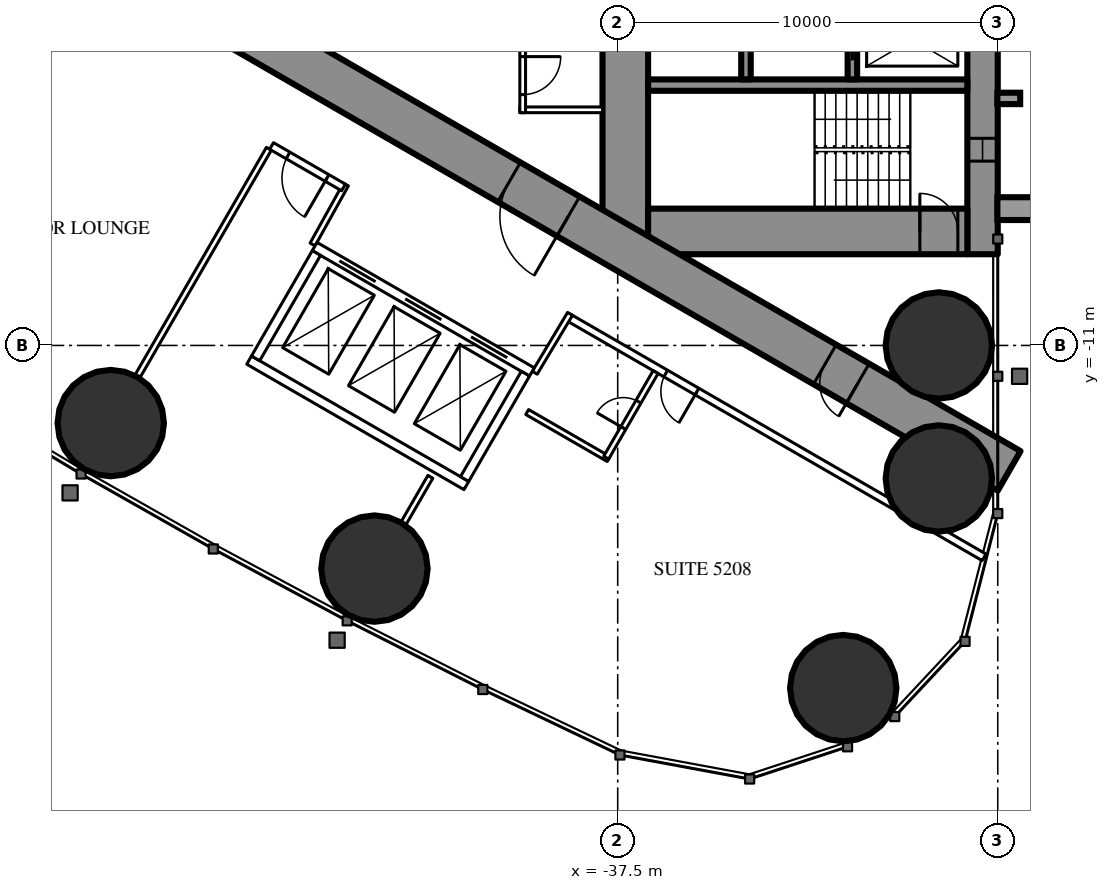
"""IFC4 building model, lengths in metres.
Left out: names, types, materials, properties, quantities, classifications, styles, units other than length and angle.
Written with IfcOpenShell. Run it as: python <this file> out.ifc"""

import sys

from ifc_helpers import new_model, si_unit, direction, frame, frame_2d, origin, origin_2d, place, context, subcontext, project, spatial, rectangle, circle, extrude, element, fill, save


model = new_model("IFC4")
c1 = context("Model", 3, precision=1e-05, world=origin(), true_north=direction((0.0, 1.0)))
c2 = subcontext(c1, "Body", "Model", "MODEL_VIEW")
j1 = project(units=[si_unit("LENGTHUNIT", "METRE"), si_unit("PLANEANGLEUNIT", "RADIAN")], contexts=[c1])
p1 = place(None, origin())
s1 = spatial("IfcSite", under=j1, at=p1, CompositionType="ELEMENT")
p2 = place(p1, origin())
s2 = spatial("IfcBuilding", under=s1, at=p2, CompositionType="ELEMENT")
p3 = place(p2, frame((0.0, 0.0, 194.8)))
s3 = spatial("IfcBuildingStorey", under=s2, at=p3, CompositionType="ELEMENT", Elevation=194.8)
for number, where, z_axis, x_axis in (
    (1, (-31.565, -20.016, 0.0), (0.0, 0.0, 1.0), (1.0, 0.0, 0.0)),
    (2, (-29.05, -11.0, 0.0), (0.0, 0.0, 1.0), (1.0, 0.0, 0.0)),
    (3, (-29.05, -14.5, 0.0), (0.0, 0.0, 1.0), (1.0, 0.0, 0.0)),
    (4, (-50.839, -13.043, 0.0), (0.0, 0.0, 1.0), (1.0, 0.0, 0.0)),
    (5, (-43.9, -16.871, 0.0), (0.0, 0.0, 1.0), (1.0, 0.0, 0.0)),
):
    element("IfcColumn", number, at=place(p3, frame(where, z_axis=z_axis, x_axis=x_axis)), inside=s3, PredefinedType="COLUMN", context=c2, shape_type="SweptSolid", body=[
        extrude(circle(Radius=1.4, at=origin_2d()), origin(), (0.0, 0.0, 1.0), 3.5),
    ])
p4 = place(p3, frame((-27.9, 8.6, 0.0), z_axis=(0.0, 0.0, 1.0), x_axis=(0.0, -1.0, 0.0)))
e6 = element("IfcWall", 6, at=p4, inside=s3, PredefinedType="SHEAR", context=c2, shape_type="SweptSolid", body=[
    extrude(rectangle(XDim=17.2, YDim=0.8, at=frame_2d((8.6, 0.0))), origin(), (0.0, 0.0, 1.0), 3.5),
])
p5 = place(p4, frame((2.45, 0.0, 0.6)))
e7 = element("IfcOpeningElement", 7, at=p5, cuts=e6, PredefinedType="OPENING", context=c2, shape_type="SweptSolid", body=[
    extrude(rectangle(XDim=0.6, YDim=2.1, at=frame_2d((0.3, 1.05))), frame((0.0, 0.41, 0.0), z_axis=(0.0, -1.0, 0.0), x_axis=(1.0, 0.0, 0.0)), (0.0, 0.0, 1.0), 0.82),
])
p6 = place(p4, frame((14.15, 0.0, 0.6)))
e8 = element("IfcOpeningElement", 8, at=p6, cuts=e6, PredefinedType="OPENING", context=c2, shape_type="SweptSolid", body=[
    extrude(rectangle(XDim=0.6, YDim=2.1, at=frame_2d((0.3, 1.05))), frame((0.0, 0.41, 0.0), z_axis=(0.0, -1.0, 0.0), x_axis=(1.0, 0.0, 0.0)), (0.0, 0.0, 1.0), 0.82),
])
p7 = place(p3, frame((-37.3, 8.6, 0.0), z_axis=(0.0, 0.0, 1.0), x_axis=(0.0, -1.0, 0.0)))
e9 = element("IfcWall", 9, at=p7, inside=s3, PredefinedType="SHEAR", context=c2, shape_type="SweptSolid", body=[
    extrude(rectangle(XDim=17.2, YDim=1.2, at=frame_2d((8.6, 0.0))), origin(), (0.0, 0.0, 1.0), 3.5),
])
p8 = place(p7, frame((7.7, 0.0, 0.0)))
e10 = element("IfcOpeningElement", 10, at=p8, cuts=e9, PredefinedType="OPENING", context=c2, shape_type="SweptSolid", body=[
    extrude(rectangle(XDim=1.8, YDim=2.2, at=frame_2d((0.9, 1.1))), frame((0.0, 0.61, 0.0), z_axis=(0.0, -1.0, 0.0), x_axis=(1.0, 0.0, 0.0)), (0.0, 0.0, 1.0), 1.22),
])
p9 = place(p3, frame((-28.3, -8.0, 0.0), z_axis=(0.0, 0.0, 1.0), x_axis=(-1.0, 0.0, 0.0)))
e11 = element("IfcWall", 11, at=p9, inside=s3, PredefinedType="SHEAR", context=c2, shape_type="SweptSolid", body=[
    extrude(rectangle(XDim=8.4, YDim=1.2, at=frame_2d((4.2, 0.0))), origin(), (0.0, 0.0, 1.0), 3.5),
])
p10 = place(p9, frame((0.25, 0.0, 0.0)))
e12 = element("IfcOpeningElement", 12, at=p10, cuts=e11, PredefinedType="OPENING", context=c2, shape_type="SweptSolid", body=[
    extrude(rectangle(XDim=1.0, YDim=2.2, at=frame_2d((0.5, 1.1))), frame((0.0, 0.61, 0.0), z_axis=(0.0, -1.0, 0.0), x_axis=(1.0, 0.0, 0.0)), (0.0, 0.0, 1.0), 1.22),
])
p11 = place(p3, frame((-28.3, -4.15, 0.0), z_axis=(0.0, 0.0, 1.0), x_axis=(-1.0, 0.0, 0.0)))
e13 = element("IfcWall", 13, at=p11, inside=s3, PredefinedType="SHEAR", context=c2, shape_type="SweptSolid", body=[
    extrude(rectangle(XDim=8.4, YDim=0.3, at=frame_2d((4.2, 0.0))), origin(), (0.0, 0.0, 1.0), 3.5),
])
p12 = place(p3, frame((-31.325, -1.9, 0.0), z_axis=(0.0, 0.0, 1.0), x_axis=(0.0, -1.0, 0.0)))
e14 = element("IfcWall", 14, at=p12, inside=s3, PredefinedType="SHEAR", context=c2, shape_type="SweptSolid", body=[
    extrude(rectangle(XDim=2.1, YDim=0.25, at=frame_2d((1.05, 0.0))), origin(), (0.0, 0.0, 1.0), 3.5),
])
p13 = place(p12, frame((0.5, 0.0, 0.0)))
e15 = element("IfcOpeningElement", 15, at=p13, cuts=e14, PredefinedType="OPENING", context=c2, shape_type="SweptSolid", body=[
    extrude(rectangle(XDim=1.1, YDim=2.2, at=frame_2d((0.55, 1.1))), frame((0.0, 0.135, 0.0), z_axis=(0.0, -1.0, 0.0), x_axis=(1.0, 0.0, 0.0)), (0.0, 0.0, 1.0), 0.27),
])
p14 = place(p3, frame((-34.125, -1.65, 0.0), z_axis=(0.0, 0.0, 1.0), x_axis=(0.0, -1.0, 0.0)))
e16 = element("IfcWall", 16, at=p14, inside=s3, PredefinedType="SHEAR", context=c2, shape_type="SweptSolid", body=[
    extrude(rectangle(XDim=2.35, YDim=0.25, at=frame_2d((1.175, 0.0))), origin(), (0.0, 0.0, 1.0), 3.5),
])
p15 = place(p14, frame((0.875, 0.0, 0.0)))
e17 = element("IfcOpeningElement", 17, at=p15, cuts=e16, PredefinedType="OPENING", context=c2, shape_type="SweptSolid", body=[
    extrude(rectangle(XDim=0.6, YDim=2.0, at=frame_2d((0.3, 1.0))), frame((0.0, 0.135, 0.0), z_axis=(0.0, -1.0, 0.0), x_axis=(1.0, 0.0, 0.0)), (0.0, 0.0, 1.0), 0.27),
])
p16 = place(p3, frame((-27.2, -14.3, 0.0), z_axis=(0.0, 0.0, 1.0), x_axis=(-0.866024021859, 0.500002393557, 0.0)))
e18 = element("IfcWall", 18, at=p16, inside=s3, PredefinedType="SHEAR", context=c2, shape_type="SweptSolid", body=[
    extrude(rectangle(XDim=27.907, YDim=1.2, at=frame_2d((13.954, 0.0))), origin(), (0.0, 0.0, 1.0), 3.5),
])
p17 = place(p16, frame((4.6, 0.0, 0.0)))
e19 = element("IfcOpeningElement", 19, at=p17, cuts=e18, PredefinedType="OPENING", context=c2, shape_type="SweptSolid", body=[
    extrude(rectangle(XDim=1.0, YDim=2.2, at=frame_2d((0.5, 1.1))), frame((0.0, 0.61, 0.0), z_axis=(0.0, -1.0, 0.0), x_axis=(1.0, 0.0, 0.0)), (0.0, 0.0, 1.0), 1.22),
])
p18 = place(p16, frame((13.395, 0.0, 0.0)))
e20 = element("IfcOpeningElement", 20, at=p18, cuts=e18, PredefinedType="OPENING", context=c2, shape_type="SweptSolid", body=[
    extrude(rectangle(XDim=1.8, YDim=2.2, at=frame_2d((0.9, 1.1))), frame((0.0, 0.61, 0.0), z_axis=(0.0, -1.0, 0.0), x_axis=(1.0, 0.0, 0.0)), (0.0, 0.0, 1.0), 1.22),
])
p19 = place(p3, frame((-46.679, -5.825, 0.0), z_axis=(0.0, 0.0, 1.0), x_axis=(-0.500006839597, -0.866021454905, 0.0)))
e21 = element("IfcWall", 21, at=p19, inside=s3, PredefinedType="PARTITIONING", context=c2, shape_type="SweptSolid", body=[
    extrude(rectangle(XDim=6.911, YDim=0.15, at=frame_2d((3.456, 0.0))), origin(), (0.0, 0.0, 1.0), 2.3),
])
p20 = place(p3, frame((-42.429, -14.457, 0.0), z_axis=(0.0, 0.0, 1.0), x_axis=(-0.5000578829, -0.865991982497, 0.0)))
e22 = element("IfcWall", 22, at=p20, inside=s3, PredefinedType="PARTITIONING", context=c2, shape_type="SweptSolid", body=[
    extrude(rectangle(XDim=1.407, YDim=0.15, at=frame_2d((0.704, 0.0))), origin(), (0.0, 0.0, 1.0), 3.25),
])
p21 = place(p3, frame((-27.86, -16.575, 0.0), z_axis=(0.0, 0.0, 1.0), x_axis=(-0.866027756871, 0.499995924312, 0.0)))
e23 = element("IfcWall", 23, at=p21, inside=s3, PredefinedType="PARTITIONING", context=c2, shape_type="SweptSolid", body=[
    extrude(rectangle(XDim=12.622, YDim=0.2, at=frame_2d((6.311, 0.0))), origin(), (0.0, 0.0, 1.0), 3.25),
])
p22 = place(p21, frame((8.722, 0.0, 0.0)))
e24 = element("IfcOpeningElement", 24, at=p22, cuts=e23, PredefinedType="OPENING", context=c2, shape_type="SweptSolid", body=[
    extrude(rectangle(XDim=0.95, YDim=2.2, at=frame_2d((0.475, 1.1))), frame((0.0, 0.11, 0.0), z_axis=(0.0, -1.0, 0.0), x_axis=(1.0, 0.0, 0.0)), (0.0, 0.0, 1.0), 0.22),
])
for number, where, z_axis, x_axis in (
    (25, (-39.683, -11.718, 0.0), (0.0, 0.0, 1.0), (0.514, 0.858, 0.0)),
    (26, (-44.652, -6.764, 0.0), (0.0, 0.0, 1.0), (-0.485, -0.874, 0.0)),
):
    element("IfcWall", number, at=place(p3, frame(where, z_axis=z_axis, x_axis=x_axis)), inside=s3, PredefinedType="PARTITIONING", context=c2, shape_type="SweptSolid", body=[
        extrude(rectangle(XDim=1.805, YDim=0.15, at=frame_2d((0.903, 0.0))), origin(), (0.0, 0.0, 1.0), 3.25),
    ])
p23 = place(p3, frame((-44.715, -6.844, 0.0), z_axis=(0.0, 0.0, 1.0), x_axis=(-0.865999496279, 0.500044870432, 0.0)))
e27 = element("IfcWall", 27, at=p23, inside=s3, PredefinedType="PARTITIONING", context=c2, shape_type="SweptSolid", body=[
    extrude(rectangle(XDim=2.185, YDim=0.2, at=frame_2d((1.092, 0.0))), origin(), (0.0, 0.0, 1.0), 3.25),
])
p24 = place(p23, frame((0.5, 0.0, 0.0)))
e28 = element("IfcOpeningElement", 28, at=p24, cuts=e27, PredefinedType="OPENING", context=c2, shape_type="SweptSolid", body=[
    extrude(rectangle(XDim=1.185, YDim=2.2, at=frame_2d((0.593, 1.1))), frame((0.0, 0.11, 0.0), z_axis=(0.0, -1.0, 0.0), x_axis=(1.0, 0.0, 0.0)), (0.0, 0.0, 1.0), 0.22),
])
p25 = place(p3, frame((-37.738, -13.989, 0.0), z_axis=(0.0, 0.0, 1.0), x_axis=(-0.86604923931, 0.499958713387, 0.0)))
e29 = element("IfcWall", 29, at=p25, inside=s3, PredefinedType="PARTITIONING", context=c2, shape_type="SweptSolid", body=[
    extrude(rectangle(XDim=2.475, YDim=0.15, at=frame_2d((1.237, 0.0))), origin(), (0.0, 0.0, 1.0), 3.25),
])
p26 = place(p3, frame((-36.503, -11.7, 0.0), z_axis=(0.0, 0.0, 1.0), x_axis=(-0.500006934395, -0.866021400173, 0.0)))
e30 = element("IfcWall", 30, at=p26, inside=s3, PredefinedType="PARTITIONING", context=c2, shape_type="SweptSolid", body=[
    extrude(rectangle(XDim=2.6, YDim=0.15, at=frame_2d((1.3, 0.0))), origin(), (0.0, 0.0, 1.0), 3.25),
])
p27 = place(p26, frame((0.9, 0.0, 0.0)))
e31 = element("IfcOpeningElement", 31, at=p27, cuts=e30, PredefinedType="OPENING", context=c2, shape_type="SweptSolid", body=[
    extrude(rectangle(XDim=0.8, YDim=2.2, at=frame_2d((0.4, 1.1))), frame((0.0, 0.085, 0.0), z_axis=(0.0, -1.0, 0.0), x_axis=(1.0, 0.0, 0.0)), (0.0, 0.0, 1.0), 0.17),
])
p28 = place(p3, frame((-37.9, -4.8, 0.0), z_axis=(0.0, 0.0, 1.0), x_axis=(-1.0, 0.0, 0.0)))
e32 = element("IfcWall", 32, at=p28, inside=s3, PredefinedType="PARTITIONING", context=c2, shape_type="SweptSolid", body=[
    extrude(rectangle(XDim=2.175, YDim=0.15, at=frame_2d((1.087, 0.0))), origin(), (0.0, 0.0, 1.0), 3.25),
])
p29 = place(p3, frame((-40.0, -2.925, 0.0), z_axis=(0.0, 0.0, 1.0), x_axis=(0.0, -1.0, 0.0)))
e33 = element("IfcWall", 33, at=p29, inside=s3, PredefinedType="PARTITIONING", context=c2, shape_type="SweptSolid", body=[
    extrude(rectangle(XDim=1.95, YDim=0.15, at=frame_2d((0.975, 0.0))), origin(), (0.0, 0.0, 1.0), 3.25),
])
p30 = place(p29, frame((0.475, 0.0, 0.0)))
e34 = element("IfcOpeningElement", 34, at=p30, cuts=e33, PredefinedType="OPENING", context=c2, shape_type="SweptSolid", body=[
    extrude(rectangle(XDim=1.0, YDim=2.2, at=frame_2d((0.5, 1.1))), frame((0.0, 0.085, 0.0), z_axis=(0.0, -1.0, 0.0), x_axis=(1.0, 0.0, 0.0)), (0.0, 0.0, 1.0), 0.17),
])
p31 = place(p3, frame((-39.758, -11.697, 0.0), z_axis=(0.0, 0.0, 1.0), x_axis=(-0.866024194504, 0.500002094529, 0.0)))
e35 = element("IfcWall", 35, at=p31, inside=s3, PredefinedType="PARTITIONING", context=c2, shape_type="SweptSolid", body=[
    extrude(rectangle(XDim=6.6, YDim=0.25, at=frame_2d((3.3, 0.0))), origin(), (0.0, 0.0, 1.0), 3.25),
])
p32 = place(p31, frame((0.75, 0.0, 0.0)))
e36 = element("IfcOpeningElement", 36, at=p32, cuts=e35, PredefinedType="OPENING", context=c2, shape_type="SweptSolid", body=[
    extrude(rectangle(XDim=1.1, YDim=2.2, at=frame_2d((0.55, 1.1))), frame((0.0, 0.135, 0.0), z_axis=(0.0, -1.0, 0.0), x_axis=(1.0, 0.0, 0.0)), (0.0, 0.0, 1.0), 0.27),
])
p33 = place(p31, frame((2.75, 0.0, 0.0)))
e37 = element("IfcOpeningElement", 37, at=p33, cuts=e35, PredefinedType="OPENING", context=c2, shape_type="SweptSolid", body=[
    extrude(rectangle(XDim=1.1, YDim=2.2, at=frame_2d((0.55, 1.1))), frame((0.0, 0.135, 0.0), z_axis=(0.0, -1.0, 0.0), x_axis=(1.0, 0.0, 0.0)), (0.0, 0.0, 1.0), 0.27),
])
p34 = place(p31, frame((4.75, 0.0, 0.0)))
e38 = element("IfcOpeningElement", 38, at=p34, cuts=e35, PredefinedType="OPENING", context=c2, shape_type="SweptSolid", body=[
    extrude(rectangle(XDim=1.1, YDim=2.2, at=frame_2d((0.55, 1.1))), frame((0.0, 0.135, 0.0), z_axis=(0.0, -1.0, 0.0), x_axis=(1.0, 0.0, 0.0)), (0.0, 0.0, 1.0), 0.27),
])
p35 = place(p3, frame((-41.482, -14.686, 0.0), z_axis=(0.0, 0.0, 1.0), x_axis=(-0.86603344179, 0.499986077507, 0.0)))
e39 = element("IfcWall", 39, at=p35, inside=s3, PredefinedType="PARTITIONING", context=c2, shape_type="SweptSolid", body=[
    extrude(rectangle(XDim=6.6, YDim=0.25, at=frame_2d((3.3, 0.0))), origin(), (0.0, 0.0, 1.0), 3.25),
])
for number, where, z_axis, x_axis in (
    (40, (-39.928, -11.743, 0.0), (0.0, 0.0, 1.0), (-0.5, -0.866, 0.0)),
    (41, (-45.428, -8.568, 0.0), (0.0, 0.0, 1.0), (-0.5, -0.866, 0.0)),
):
    element("IfcWall", number, at=place(p3, frame(where, z_axis=z_axis, x_axis=x_axis)), inside=s3, PredefinedType="PARTITIONING", context=c2, shape_type="SweptSolid", body=[
        extrude(rectangle(XDim=3.201, YDim=0.25, at=frame_2d((1.6, 0.0))), origin(), (0.0, 0.0, 1.0), 3.25),
    ])
p36 = place(p27, origin())
e42 = element("IfcDoor", 42, at=p36, inside=s3, OperationType="SINGLE_SWING_RIGHT", PredefinedType="DOOR", context=c2, shape_type="SweptSolid", body=[
    extrude(rectangle(XDim=0.8, YDim=2.2, at=frame_2d((0.4, 1.1))), frame((0.0, 0.025, 0.0), z_axis=(0.0, -1.0, 0.0), x_axis=(1.0, 0.0, 0.0)), (0.0, 0.0, 1.0), 0.05),
])
fill(e31, e42)
p37 = place(p22, origin())
e43 = element("IfcDoor", 43, at=p37, inside=s3, OperationType="SINGLE_SWING_LEFT", PredefinedType="DOOR", context=c2, shape_type="SweptSolid", body=[
    extrude(rectangle(XDim=0.95, YDim=2.2, at=frame_2d((0.475, 1.1))), frame((0.0, 0.025, 0.0), z_axis=(0.0, -1.0, 0.0), x_axis=(1.0, 0.0, 0.0)), (0.0, 0.0, 1.0), 0.05),
])
fill(e24, e43)
p38 = place(p24, origin())
e44 = element("IfcDoor", 44, at=p38, inside=s3, OperationType="SINGLE_SWING_LEFT", PredefinedType="DOOR", context=c2, shape_type="SweptSolid", body=[
    extrude(rectangle(XDim=1.185, YDim=2.2, at=frame_2d((0.593, 1.1))), frame((0.0, 0.025, 0.0), z_axis=(0.0, -1.0, 0.0), x_axis=(1.0, 0.0, 0.0)), (0.0, 0.0, 1.0), 0.05),
])
fill(e28, e44)
p39 = place(p30, origin())
e45 = element("IfcDoor", 45, at=p39, inside=s3, OperationType="SINGLE_SWING_LEFT", PredefinedType="DOOR", context=c2, shape_type="SweptSolid", body=[
    extrude(rectangle(XDim=1.0, YDim=2.2, at=frame_2d((0.5, 1.1))), frame((0.0, 0.025, 0.0), z_axis=(0.0, -1.0, 0.0), x_axis=(1.0, 0.0, 0.0)), (0.0, 0.0, 1.0), 0.05),
])
fill(e34, e45)
p40 = place(p17, origin())
e46 = element("IfcDoor", 46, at=p40, inside=s3, OperationType="SINGLE_SWING_LEFT", PredefinedType="DOOR", context=c2, shape_type="SweptSolid", body=[
    extrude(rectangle(XDim=1.0, YDim=2.2, at=frame_2d((0.5, 1.1))), frame((0.0, 0.025, 0.0), z_axis=(0.0, -1.0, 0.0), x_axis=(1.0, 0.0, 0.0)), (0.0, 0.0, 1.0), 0.05),
])
fill(e19, e46)
p41 = place(p18, origin())
e47 = element("IfcDoor", 47, at=p41, inside=s3, OperationType="DOUBLE_DOOR_SINGLE_SWING", PredefinedType="DOOR", context=c2, shape_type="SweptSolid", body=[
    extrude(rectangle(XDim=1.8, YDim=2.2, at=frame_2d((0.9, 1.1))), frame((0.0, 0.025, 0.0), z_axis=(0.0, -1.0, 0.0), x_axis=(1.0, 0.0, 0.0)), (0.0, 0.0, 1.0), 0.05),
])
fill(e20, e47)
p42 = place(p10, origin())
e48 = element("IfcDoor", 48, at=p42, inside=s3, OperationType="SINGLE_SWING_RIGHT", PredefinedType="DOOR", context=c2, shape_type="SweptSolid", body=[
    extrude(rectangle(XDim=1.0, YDim=2.2, at=frame_2d((0.5, 1.1))), frame((0.0, 0.025, 0.0), z_axis=(0.0, -1.0, 0.0), x_axis=(1.0, 0.0, 0.0)), (0.0, 0.0, 1.0), 0.05),
])
fill(e12, e48)
p43 = place(p13, origin())
e49 = element("IfcDoor", 49, at=p43, inside=s3, OperationType="SLIDING_TO_LEFT", PredefinedType="USERDEFINED", context=c2, shape_type="SweptSolid", body=[
    extrude(rectangle(XDim=1.1, YDim=2.2, at=frame_2d((0.55, 1.1))), frame((0.0, 0.025, 0.0), z_axis=(0.0, -1.0, 0.0), x_axis=(1.0, 0.0, 0.0)), (0.0, 0.0, 1.0), 0.05),
])
fill(e15, e49)
p44 = place(p32, origin())
e50 = element("IfcDoor", 50, at=p44, inside=s3, OperationType="DOUBLE_DOOR_SLIDING", PredefinedType="USERDEFINED", context=c2, shape_type="SweptSolid", body=[
    extrude(rectangle(XDim=1.1, YDim=2.2, at=frame_2d((0.55, 1.1))), frame((0.0, 0.025, 0.0), z_axis=(0.0, -1.0, 0.0), x_axis=(1.0, 0.0, 0.0)), (0.0, 0.0, 1.0), 0.05),
])
fill(e36, e50)
p45 = place(p33, origin())
e51 = element("IfcDoor", 51, at=p45, inside=s3, OperationType="DOUBLE_DOOR_SLIDING", PredefinedType="USERDEFINED", context=c2, shape_type="SweptSolid", body=[
    extrude(rectangle(XDim=1.1, YDim=2.2, at=frame_2d((0.55, 1.1))), frame((0.0, 0.025, 0.0), z_axis=(0.0, -1.0, 0.0), x_axis=(1.0, 0.0, 0.0)), (0.0, 0.0, 1.0), 0.05),
])
fill(e37, e51)
p46 = place(p34, origin())
e52 = element("IfcDoor", 52, at=p46, inside=s3, OperationType="DOUBLE_DOOR_SLIDING", PredefinedType="USERDEFINED", context=c2, shape_type="SweptSolid", body=[
    extrude(rectangle(XDim=1.1, YDim=2.2, at=frame_2d((0.55, 1.1))), frame((0.0, 0.025, 0.0), z_axis=(0.0, -1.0, 0.0), x_axis=(1.0, 0.0, 0.0)), (0.0, 0.0, 1.0), 0.05),
])
fill(e38, e52)
p47 = place(p6, origin())
e53 = element("IfcWindow", 53, at=p47, inside=s3, PartitioningType="SINGLE_PANEL", PredefinedType="WINDOW", context=c2, shape_type="SweptSolid", body=[
    extrude(rectangle(XDim=0.6, YDim=2.1, at=frame_2d((0.3, 1.05))), frame((0.0, 0.03, 0.0), z_axis=(0.0, -1.0, 0.0), x_axis=(1.0, 0.0, 0.0)), (0.0, 0.0, 1.0), 0.06),
])
fill(e8, e53)
save(model, sys.argv[1])
